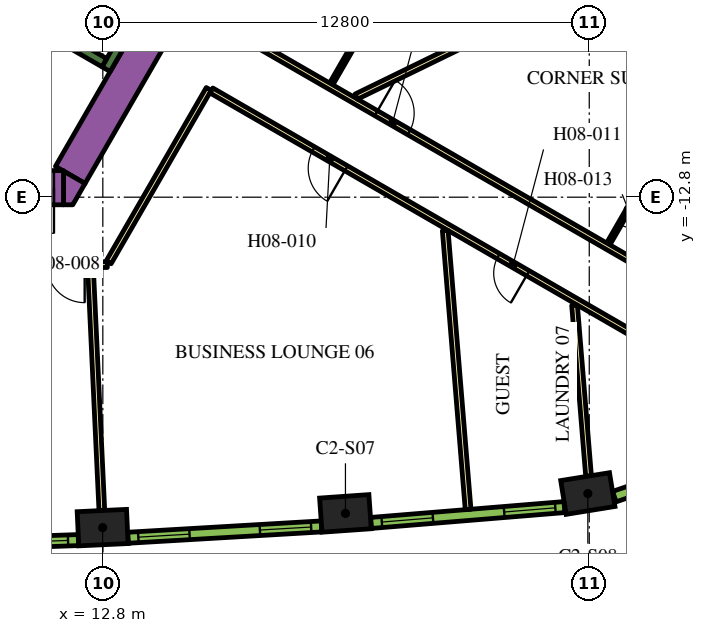
"""IFC4 building model, lengths in metres.
Left out: names, types, materials, properties, quantities, classifications, styles, units other than length and angle.
Written with IfcOpenShell. Run it as: python <this file> out.ifc"""

import sys

from ifc_helpers import new_model, si_unit, direction, frame, frame_2d, origin, origin_2d, place, context, subcontext, project, spatial, polyline, rectangle, outline, extrude, element, fill, save


model = new_model("IFC4")
c1 = context("Model", 3, precision=1e-05, world=origin(), true_north=direction((0.0, 1.0)))
c2 = subcontext(c1, "Body", "Model", "MODEL_VIEW")
j1 = project(units=[si_unit("LENGTHUNIT", "METRE"), si_unit("PLANEANGLEUNIT", "RADIAN")], contexts=[c1])
p1 = place(None, origin())
s1 = spatial("IfcSite", under=j1, at=p1, CompositionType="ELEMENT")
p2 = place(p1, origin())
s2 = spatial("IfcBuilding", under=s1, at=p2, CompositionType="ELEMENT")
p3 = place(p2, frame((0.0, 0.0, 114.9)))
s3 = spatial("IfcBuildingStorey", under=s2, at=p3, CompositionType="ELEMENT", Elevation=114.9)
for number, where, z_axis, x_axis in (
    (1, (12.795, -21.494, 0.0), (0.0, 0.0, 1.0), (0.999, 0.047, 0.0)),
    (2, (19.184, -21.12, 0.0), (0.0, 0.0, 1.0), (0.998, 0.07, 0.0)),
    (3, (25.563, -20.597, 0.0), (0.0, 0.0, 1.0), (0.987, 0.159, 0.0)),
):
    element("IfcColumn", number, at=place(p3, frame(where, z_axis=z_axis, x_axis=x_axis)), inside=s3, PredefinedType="COLUMN", context=c2, shape_type="SweptSolid", body=[
        extrude(rectangle(XDim=1.3, YDim=0.9, at=origin_2d()), origin(), (0.0, 0.0, 1.0), 3.9),
    ])
p4 = place(p3, frame((11.943, -12.214, 0.0), z_axis=(0.0, 0.0, 1.0), x_axis=(0.49998092645, 0.866036415623, 0.0)))
e4 = element("IfcWall", 4, at=p4, inside=s3, PredefinedType="SOLIDWALL", context=c2, shape_type="SweptSolid", body=[
    extrude(rectangle(XDim=8.83, YDim=0.9, at=frame_2d((4.415, 0.0))), origin(), (0.0, 0.0, 1.0), 3.9),
])
p5 = place(p3, origin())
e5 = element("IfcWall", 5, at=p5, inside=s3, PredefinedType="SOLIDWALL", context=c2, shape_type="SweptSolid", body=[
    extrude(outline(polyline([(12.009, -13.0), (11.764, -13.0), (11.764, -12.113), (12.332, -12.441), (12.009, -13.0)])), origin(), (0.0, 0.0, 1.0), 3.9),
])
p6 = place(p3, frame((12.885, -9.431, 0.0), z_axis=(0.0, 0.0, 1.0), x_axis=(0.500020560727, 0.866013532718, 0.0)))
e6 = element("IfcWall", 6, at=p6, inside=s3, PredefinedType="SOLIDWALL", context=c2, shape_type="SweptSolid", body=[
    extrude(rectangle(XDim=3.45, YDim=0.25, at=frame_2d((1.725, 0.0))), origin(), (0.0, 0.0, 1.0), 3.9),
])
p7 = place(p3, frame((12.84, -9.261, 0.0), z_axis=(0.0, 0.0, 1.0), x_axis=(-0.866013990052, 0.500019768644, 0.0)))
e7 = element("IfcWall", 7, at=p7, inside=s3, PredefinedType="SOLIDWALL", context=c2, shape_type="SweptSolid", body=[
    extrude(rectangle(XDim=6.8, YDim=0.25, at=frame_2d((3.4, 0.0))), origin(), (0.0, 0.0, 1.0), 3.9),
])
p8 = place(p3, frame((11.764, -12.55, 0.0), z_axis=(0.0, 0.0, 1.0), x_axis=(-1.0, 0.0, 0.0)))
e8 = element("IfcWall", 8, at=p8, inside=s3, PredefinedType="SOLIDWALL", context=c2, shape_type="SweptSolid", body=[
    extrude(rectangle(XDim=1.7, YDim=0.9, at=frame_2d((0.85, 0.0))), origin(), (0.0, 0.0, 1.0), 3.9),
])
p9 = place(p8, frame((0.25, 0.0, 0.0)))
e9 = element("IfcOpeningElement", 9, at=p9, cuts=e8, PredefinedType="OPENING", context=c2, shape_type="SweptSolid", body=[
    extrude(rectangle(XDim=1.2, YDim=2.1, at=frame_2d((0.6, 1.05))), frame((0.0, 0.46, 0.0), z_axis=(0.0, -1.0, 0.0), x_axis=(1.0, 0.0, 0.0)), (0.0, 0.0, 1.0), 0.92),
])
p10 = place(p3, frame((16.412, -8.523, 0.0), z_axis=(0.0, 0.0, 1.0), x_axis=(0.866025629663, -0.499999608766, 0.0)))
e10 = element("IfcWall", 10, at=p10, inside=s3, PredefinedType="PARTITIONING", context=c2, shape_type="SweptSolid", body=[
    extrude(rectangle(XDim=13.624, YDim=0.15, at=frame_2d((6.812, 0.0))), origin(), (0.0, 0.0, 1.0), 2.75),
])
p11 = place(p10, frame((4.134, 0.0, 0.0)))
e11 = element("IfcOpeningElement", 11, at=p11, cuts=e10, PredefinedType="OPENING", context=c2, shape_type="SweptSolid", body=[
    extrude(rectangle(XDim=1.0, YDim=2.1, at=frame_2d((0.5, 1.05))), frame((0.0, 0.085, 0.0), z_axis=(0.0, -1.0, 0.0), x_axis=(1.0, 0.0, 0.0)), (0.0, 0.0, 1.0), 0.17),
])
p12 = place(p3, frame((12.918, -14.575, 0.0), z_axis=(0.0, 0.0, 1.0), x_axis=(-1.0, 0.0, 0.0)))
e12 = element("IfcWall", 12, at=p12, inside=s3, PredefinedType="PARTITIONING", context=c2, shape_type="SweptSolid", body=[
    extrude(rectangle(XDim=25.766, YDim=0.15, at=frame_2d((12.883, 0.0))), origin(), (0.0, 0.0, 1.0), 2.75),
])
p13 = place(p12, frame((24.586, 0.0, 0.0)))
e13 = element("IfcOpeningElement", 13, at=p13, cuts=e12, PredefinedType="OPENING", context=c2, shape_type="SweptSolid", body=[
    extrude(rectangle(XDim=1.0, YDim=2.1, at=frame_2d((0.5, 1.05))), frame((0.0, 0.085, 0.0), z_axis=(0.0, -1.0, 0.0), x_axis=(1.0, 0.0, 0.0)), (0.0, 0.0, 1.0), 0.17),
])
p14 = place(p12, frame((13.144, 0.0, 0.0)))
e14 = element("IfcOpeningElement", 14, at=p14, cuts=e12, PredefinedType="OPENING", context=c2, shape_type="SweptSolid", body=[
    extrude(rectangle(XDim=1.0, YDim=2.1, at=frame_2d((0.5, 1.05))), frame((0.0, 0.085, 0.0), z_axis=(0.0, -1.0, 0.0), x_axis=(1.0, 0.0, 0.0)), (0.0, 0.0, 1.0), 0.17),
])
p15 = place(p12, frame((10.874, 0.0, 0.0)))
e15 = element("IfcOpeningElement", 15, at=p15, cuts=e12, PredefinedType="OPENING", context=c2, shape_type="SweptSolid", body=[
    extrude(rectangle(XDim=0.9, YDim=2.1, at=frame_2d((0.45, 1.05))), frame((0.0, 0.085, 0.0), z_axis=(0.0, -1.0, 0.0), x_axis=(1.0, 0.0, 0.0)), (0.0, 0.0, 1.0), 0.17),
])
p16 = place(p12, frame((0.596, 0.0, 0.0)))
e16 = element("IfcOpeningElement", 16, at=p16, cuts=e12, PredefinedType="OPENING", context=c2, shape_type="SweptSolid", body=[
    extrude(rectangle(XDim=1.0, YDim=2.1, at=frame_2d((0.5, 1.05))), frame((0.0, 0.085, 0.0), z_axis=(0.0, -1.0, 0.0), x_axis=(1.0, 0.0, 0.0)), (0.0, 0.0, 1.0), 0.17),
])
p17 = place(p3, frame((15.587, -9.952, 0.0), z_axis=(0.0, 0.0, 1.0), x_axis=(-0.500016618951, -0.866015808616, 0.0)))
e17 = element("IfcWall", 17, at=p17, inside=s3, PredefinedType="PARTITIONING", context=c2, shape_type="SweptSolid", body=[
    extrude(rectangle(XDim=5.268, YDim=0.15, at=frame_2d((2.634, 0.0))), origin(), (0.0, 0.0, 1.0), 2.75),
])
p18 = place(p3, frame((27.386, -16.764, 0.0), z_axis=(0.0, 0.0, 1.0), x_axis=(-0.866022585856, 0.500004880763, 0.0)))
e18 = element("IfcWall", 18, at=p18, inside=s3, PredefinedType="PARTITIONING", context=c2, shape_type="SweptSolid", body=[
    extrude(rectangle(XDim=13.544, YDim=0.15, at=frame_2d((6.772, 0.0))), origin(), (0.0, 0.0, 1.0), 2.75),
])
p19 = place(p18, frame((9.447, 0.0, 0.0)))
e19 = element("IfcOpeningElement", 19, at=p19, cuts=e18, PredefinedType="OPENING", context=c2, shape_type="SweptSolid", body=[
    extrude(rectangle(XDim=1.0, YDim=2.1, at=frame_2d((0.5, 1.05))), frame((0.0, 0.085, 0.0), z_axis=(0.0, -1.0, 0.0), x_axis=(1.0, 0.0, 0.0)), (0.0, 0.0, 1.0), 0.17),
])
p20 = place(p18, frame((3.926, 0.0, 0.0)))
e20 = element("IfcOpeningElement", 20, at=p20, cuts=e18, PredefinedType="OPENING", context=c2, shape_type="SweptSolid", body=[
    extrude(rectangle(XDim=0.9, YDim=2.1, at=frame_2d((0.45, 1.05))), frame((0.0, 0.085, 0.0), z_axis=(0.0, -1.0, 0.0), x_axis=(1.0, 0.0, 0.0)), (0.0, 0.0, 1.0), 0.17),
])
p21 = place(p3, frame((12.774, -21.045, 0.0), z_axis=(0.0, 0.0, 1.0), x_axis=(-0.046750341626, 0.998906605023, 0.0)))
e21 = element("IfcWall", 21, at=p21, inside=s3, PredefinedType="PARTITIONING", context=c2, shape_type="SweptSolid", body=[
    extrude(rectangle(XDim=6.392, YDim=0.15, at=frame_2d((3.196, 0.0))), origin(), (0.0, 0.0, 1.0), 2.75),
])
p22 = place(p3, frame((27.478, -6.251, 0.0), z_axis=(0.0, 0.0, 1.0), x_axis=(-0.898940618603, -0.438070501432, 0.0)))
e22 = element("IfcWall", 22, at=p22, inside=s3, PredefinedType="PARTITIONING", context=c2, shape_type="SweptSolid", body=[
    extrude(rectangle(XDim=8.909, YDim=0.15, at=frame_2d((4.455, 0.0))), origin(), (0.0, 0.0, 1.0), 2.75),
])
p23 = place(p3, frame((22.412, -21.016, 0.0), z_axis=(0.0, 0.0, 1.0), x_axis=(-0.081744540534, 0.996653314896, 0.0)))
e23 = element("IfcWall", 23, at=p23, inside=s3, PredefinedType="PARTITIONING", context=c2, shape_type="SweptSolid", body=[
    extrude(rectangle(XDim=7.362, YDim=0.15, at=frame_2d((3.681, 0.0))), origin(), (0.0, 0.0, 1.0), 2.75),
])
p24 = place(p3, frame((25.582, -20.138, 0.0), z_axis=(0.0, 0.0, 1.0), x_axis=(-0.081746132986, 0.996653184283, 0.0)))
e24 = element("IfcWall", 24, at=p24, inside=s3, PredefinedType="PARTITIONING", context=c2, shape_type="SweptSolid", body=[
    extrude(rectangle(XDim=4.51, YDim=0.15, at=frame_2d((2.255, 0.0))), origin(), (0.0, 0.0, 1.0), 2.75),
])
p25 = place(p3, frame((27.5, -11.605, 0.0), z_axis=(0.0, 0.0, 1.0), x_axis=(-0.500049511043, -0.865996816683, 0.0)))
e25 = element("IfcWall", 25, at=p25, inside=s3, PredefinedType="PARTITIONING", context=c2, shape_type="SweptSolid", body=[
    extrude(rectangle(XDim=2.8, YDim=0.1, at=frame_2d((1.4, 0.0))), origin(), (0.0, 0.0, 1.0), 2.75),
])
p26 = place(p25, frame((1.3, 0.0, 0.0)))
e26 = element("IfcOpeningElement", 26, at=p26, cuts=e25, PredefinedType="OPENING", context=c2, shape_type="SweptSolid", body=[
    extrude(rectangle(XDim=0.9, YDim=2.1, at=frame_2d((0.45, 1.05))), frame((0.0, 0.06, 0.0), z_axis=(0.0, -1.0, 0.0), x_axis=(1.0, 0.0, 0.0)), (0.0, 0.0, 1.0), 0.12),
])
p27 = place(p3, frame((19.877, -7.972, 0.0), z_axis=(0.0, 0.0, 1.0), x_axis=(-0.500010206181, -0.866019511163, 0.0)))
e27 = element("IfcWall", 27, at=p27, inside=s3, PredefinedType="PARTITIONING", context=c2, shape_type="SweptSolid", body=[
    extrude(rectangle(XDim=2.13, YDim=0.1, at=frame_2d((1.065, 0.0))), origin(), (0.0, 0.0, 1.0), 2.75),
])
p28 = place(p3, frame((7.059, -22.001, 0.0), z_axis=(0.0, 0.0, 1.0), x_axis=(0.999385993957, 0.035037623812, 0.0)))
e28 = element("IfcWall", 28, at=p28, inside=s3, PredefinedType="SOLIDWALL", context=c2, shape_type="SweptSolid", body=[
    extrude(rectangle(XDim=5.101, YDim=0.29, at=frame_2d((2.55, 0.0))), origin(), (0.0, 0.0, 1.0), 3.65),
])
p29 = place(p28, frame((0.273, 0.0, 0.9)))
e29 = element("IfcOpeningElement", 29, at=p29, cuts=e28, PredefinedType="OPENING", context=c2, shape_type="SweptSolid", body=[
    extrude(rectangle(XDim=1.35, YDim=2.15, at=frame_2d((0.675, 1.075))), frame((0.0, 0.155, 0.0), z_axis=(0.0, -1.0, 0.0), x_axis=(1.0, 0.0, 0.0)), (0.0, 0.0, 1.0), 0.31),
])
p30 = place(p28, frame((3.478, 0.0, 0.9)))
e30 = element("IfcOpeningElement", 30, at=p30, cuts=e28, PredefinedType="OPENING", context=c2, shape_type="SweptSolid", body=[
    extrude(rectangle(XDim=1.35, YDim=2.15, at=frame_2d((0.675, 1.075))), frame((0.0, 0.155, 0.0), z_axis=(0.0, -1.0, 0.0), x_axis=(1.0, 0.0, 0.0)), (0.0, 0.0, 1.0), 0.31),
])
p31 = place(p3, frame((13.462, -21.761, 0.0), z_axis=(0.0, 0.0, 1.0), x_axis=(0.998290511436, 0.058447025388, 0.0)))
e31 = element("IfcWall", 31, at=p31, inside=s3, PredefinedType="SOLIDWALL", context=c2, shape_type="SweptSolid", body=[
    extrude(rectangle(XDim=5.1, YDim=0.29, at=frame_2d((2.55, 0.0))), origin(), (0.0, 0.0, 1.0), 3.65),
])
p32 = place(p31, frame((0.272, 0.0, 0.9)))
e32 = element("IfcOpeningElement", 32, at=p32, cuts=e31, PredefinedType="OPENING", context=c2, shape_type="SweptSolid", body=[
    extrude(rectangle(XDim=1.35, YDim=2.15, at=frame_2d((0.675, 1.075))), frame((0.0, 0.155, 0.0), z_axis=(0.0, -1.0, 0.0), x_axis=(1.0, 0.0, 0.0)), (0.0, 0.0, 1.0), 0.31),
])
p33 = place(p31, frame((3.478, 0.0, 0.9)))
e33 = element("IfcOpeningElement", 33, at=p33, cuts=e31, PredefinedType="OPENING", context=c2, shape_type="SweptSolid", body=[
    extrude(rectangle(XDim=1.35, YDim=2.15, at=frame_2d((0.675, 1.075))), frame((0.0, 0.155, 0.0), z_axis=(0.0, -1.0, 0.0), x_axis=(1.0, 0.0, 0.0)), (0.0, 0.0, 1.0), 0.31),
])
p34 = place(p3, frame((19.857, -21.371, 0.0), z_axis=(0.0, 0.0, 1.0), x_axis=(0.99665273362, 0.081751627308, 0.0)))
e34 = element("IfcWall", 34, at=p34, inside=s3, PredefinedType="SOLIDWALL", context=c2, shape_type="SweptSolid", body=[
    extrude(rectangle(XDim=5.107, YDim=0.29, at=frame_2d((2.553, 0.0))), origin(), (0.0, 0.0, 1.0), 3.65),
])
p35 = place(p34, frame((0.285, 0.0, 0.9)))
e35 = element("IfcOpeningElement", 35, at=p35, cuts=e34, PredefinedType="OPENING", context=c2, shape_type="SweptSolid", body=[
    extrude(rectangle(XDim=1.35, YDim=2.15, at=frame_2d((0.675, 1.075))), frame((0.0, 0.155, 0.0), z_axis=(0.0, -1.0, 0.0), x_axis=(1.0, 0.0, 0.0)), (0.0, 0.0, 1.0), 0.31),
])
p36 = place(p34, frame((3.516, 0.0, 0.9)))
e36 = element("IfcOpeningElement", 36, at=p36, cuts=e34, PredefinedType="OPENING", context=c2, shape_type="SweptSolid", body=[
    extrude(rectangle(XDim=1.35, YDim=2.15, at=frame_2d((0.675, 1.075))), frame((0.0, 0.155, 0.0), z_axis=(0.0, -1.0, 0.0), x_axis=(1.0, 0.0, 0.0)), (0.0, 0.0, 1.0), 0.31),
])
p37 = place(p3, frame((26.261, -20.679, 0.0), z_axis=(0.0, 0.0, 1.0), x_axis=(0.945385815453, 0.325953462844, 0.0)))
e37 = element("IfcWall", 37, at=p37, inside=s3, PredefinedType="SOLIDWALL", context=c2, shape_type="SweptSolid", body=[
    extrude(rectangle(XDim=1.819, YDim=0.29, at=frame_2d((0.91, 0.0))), origin(), (0.0, 0.0, 1.0), 3.65),
])
p38 = place(p37, frame((0.46, 0.0, 0.9)))
e38 = element("IfcOpeningElement", 38, at=p38, cuts=e37, PredefinedType="OPENING", context=c2, shape_type="SweptSolid", body=[
    extrude(rectangle(XDim=0.9, YDim=2.15, at=frame_2d((0.45, 1.075))), frame((0.0, 0.155, 0.0), z_axis=(0.0, -1.0, 0.0), x_axis=(1.0, 0.0, 0.0)), (0.0, 0.0, 1.0), 0.31),
])
p39 = place(p9, origin())
e39 = element("IfcDoor", 39, at=p39, inside=s3, OperationType="SINGLE_SWING_LEFT", PredefinedType="DOOR", context=c2, shape_type="SweptSolid", body=[
    extrude(rectangle(XDim=1.2, YDim=2.1, at=frame_2d((0.6, 1.05))), frame((0.0, 0.025, 0.0), z_axis=(0.0, -1.0, 0.0), x_axis=(1.0, 0.0, 0.0)), (0.0, 0.0, 1.0), 0.05),
])
fill(e9, e39)
p40 = place(p16, origin())
e40 = element("IfcDoor", 40, at=p40, inside=s3, OperationType="SINGLE_SWING_LEFT", PredefinedType="DOOR", context=c2, shape_type="SweptSolid", body=[
    extrude(rectangle(XDim=1.0, YDim=2.1, at=frame_2d((0.5, 1.05))), frame((0.0, 0.025, 0.0), z_axis=(0.0, -1.0, 0.0), x_axis=(1.0, 0.0, 0.0)), (0.0, 0.0, 1.0), 0.05),
])
fill(e16, e40)
p41 = place(p19, origin())
e41 = element("IfcDoor", 41, at=p41, inside=s3, OperationType="SINGLE_SWING_RIGHT", PredefinedType="DOOR", context=c2, shape_type="SweptSolid", body=[
    extrude(rectangle(XDim=1.0, YDim=2.1, at=frame_2d((0.5, 1.05))), frame((0.0, 0.025, 0.0), z_axis=(0.0, -1.0, 0.0), x_axis=(1.0, 0.0, 0.0)), (0.0, 0.0, 1.0), 0.05),
])
fill(e19, e41)
p42 = place(p20, origin())
e42 = element("IfcDoor", 42, at=p42, inside=s3, OperationType="SINGLE_SWING_LEFT", PredefinedType="DOOR", context=c2, shape_type="SweptSolid", body=[
    extrude(rectangle(XDim=0.9, YDim=2.1, at=frame_2d((0.45, 1.05))), frame((0.0, 0.025, 0.0), z_axis=(0.0, -1.0, 0.0), x_axis=(1.0, 0.0, 0.0)), (0.0, 0.0, 1.0), 0.05),
])
fill(e20, e42)
p43 = place(p11, origin())
e43 = element("IfcDoor", 43, at=p43, inside=s3, OperationType="SINGLE_SWING_LEFT", PredefinedType="DOOR", context=c2, shape_type="SweptSolid", body=[
    extrude(rectangle(XDim=1.0, YDim=2.1, at=frame_2d((0.5, 1.05))), frame((0.0, 0.025, 0.0), z_axis=(0.0, -1.0, 0.0), x_axis=(1.0, 0.0, 0.0)), (0.0, 0.0, 1.0), 0.05),
])
fill(e11, e43)
p44 = place(p26, origin())
e44 = element("IfcDoor", 44, at=p44, inside=s3, OperationType="SINGLE_SWING_LEFT", PredefinedType="DOOR", context=c2, shape_type="SweptSolid", body=[
    extrude(rectangle(XDim=0.9, YDim=2.1, at=frame_2d((0.45, 1.05))), frame((0.0, 0.025, 0.0), z_axis=(0.0, -1.0, 0.0), x_axis=(1.0, 0.0, 0.0)), (0.0, 0.0, 1.0), 0.05),
])
fill(e26, e44)
p45 = place(p30, origin())
e45 = element("IfcWindow", 45, at=p45, inside=s3, PartitioningType="DOUBLE_PANEL_VERTICAL", PredefinedType="WINDOW", context=c2, shape_type="SweptSolid", body=[
    extrude(rectangle(XDim=1.35, YDim=2.15, at=frame_2d((0.675, 1.075))), frame((0.0, 0.015, 0.0), z_axis=(0.0, -1.0, 0.0), x_axis=(1.0, 0.0, 0.0)), (0.0, 0.0, 1.0), 0.06),
])
fill(e30, e45)
p46 = place(p32, origin())
e46 = element("IfcWindow", 46, at=p46, inside=s3, PartitioningType="DOUBLE_PANEL_VERTICAL", PredefinedType="WINDOW", context=c2, shape_type="SweptSolid", body=[
    extrude(rectangle(XDim=1.35, YDim=2.15, at=frame_2d((0.675, 1.075))), frame((0.0, 0.015, 0.0), z_axis=(0.0, -1.0, 0.0), x_axis=(1.0, 0.0, 0.0)), (0.0, 0.0, 1.0), 0.06),
])
fill(e32, e46)
p47 = place(p33, origin())
e47 = element("IfcWindow", 47, at=p47, inside=s3, PartitioningType="DOUBLE_PANEL_VERTICAL", PredefinedType="WINDOW", context=c2, shape_type="SweptSolid", body=[
    extrude(rectangle(XDim=1.35, YDim=2.15, at=frame_2d((0.675, 1.075))), frame((0.0, 0.015, 0.0), z_axis=(0.0, -1.0, 0.0), x_axis=(1.0, 0.0, 0.0)), (0.0, 0.0, 1.0), 0.06),
])
fill(e33, e47)
p48 = place(p35, origin())
e48 = element("IfcWindow", 48, at=p48, inside=s3, PartitioningType="DOUBLE_PANEL_VERTICAL", PredefinedType="WINDOW", context=c2, shape_type="SweptSolid", body=[
    extrude(rectangle(XDim=1.35, YDim=2.15, at=frame_2d((0.675, 1.075))), frame((0.0, 0.015, 0.0), z_axis=(0.0, -1.0, 0.0), x_axis=(1.0, 0.0, 0.0)), (0.0, 0.0, 1.0), 0.06),
])
fill(e35, e48)
p49 = place(p36, origin())
e49 = element("IfcWindow", 49, at=p49, inside=s3, PartitioningType="DOUBLE_PANEL_VERTICAL", PredefinedType="WINDOW", context=c2, shape_type="SweptSolid", body=[
    extrude(rectangle(XDim=1.35, YDim=2.15, at=frame_2d((0.675, 1.075))), frame((0.0, 0.015, 0.0), z_axis=(0.0, -1.0, 0.0), x_axis=(1.0, 0.0, 0.0)), (0.0, 0.0, 1.0), 0.06),
])
fill(e36, e49)
save(model, sys.argv[1])
